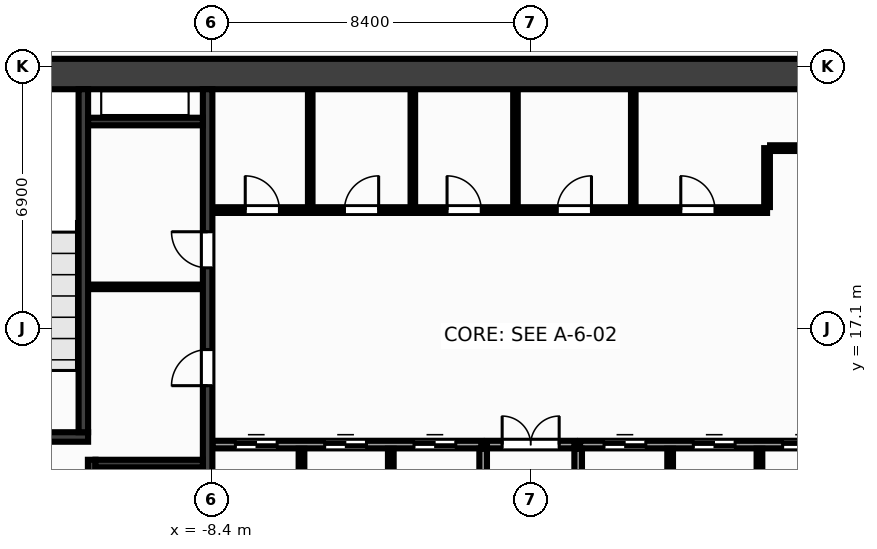
"""IFC4 building model, lengths in metres.
Left out: names, types, materials, properties, quantities, classifications, styles, units other than length and angle.
Written with IfcOpenShell. Run it as: python <this file> out.ifc"""

import sys

from ifc_helpers import new_model, si_unit, direction, frame, frame_2d, origin, place, context, subcontext, project, spatial, rectangle, extrude, source, transform, mapped, element, fill, save


model = new_model("IFC4")
c1 = context("Model", 3, precision=1e-05, world=origin(), true_north=direction((0.0, 1.0)))
c2 = subcontext(c1, "Body", "Model", "MODEL_VIEW")
j1 = project(units=[si_unit("LENGTHUNIT", "METRE"), si_unit("PLANEANGLEUNIT", "RADIAN")], contexts=[c1])
p1 = place(None, origin())
s1 = spatial("IfcSite", under=j1, at=p1, CompositionType="ELEMENT")
p2 = place(p1, origin())
s2 = spatial("IfcBuilding", under=s1, at=p2, CompositionType="ELEMENT")
p3 = place(p2, origin())
s3 = spatial("IfcBuildingStorey", under=s2, at=p3, CompositionType="ELEMENT", Elevation=0.0)
m1 = source(origin(), c2, "Body", "SweptSolid", [
    extrude(rectangle(XDim=32.0, YDim=0.8, at=frame_2d((16.0, 0.0))), origin(), (0.0, 0.0, 1.0), 5.0),
])
p4 = place(p3, frame((-16.0, 23.8, 0.0), z_axis=(0.0, 0.0, 1.0), x_axis=(1.0, 0.0, 0.0)))
e1 = element("IfcWall", 1, at=p4, inside=s3, PredefinedType="SHEAR", context=c2, shape_type="MappedRepresentation", body=[
    mapped(m1, transform((0.0, 0.0, 0.0), x_axis=(1.0, 0.0, 0.0), y_axis=(0.0, 1.0, 0.0), z_axis=(0.0, 0.0, 1.0), scale=1.0)),
])
m2 = source(origin(), c2, "Body", "SweptSolid", [
    extrude(rectangle(XDim=12.8, YDim=0.25, at=frame_2d((6.4, 0.0))), origin(), (0.0, 0.0, 1.0), 5.0),
])
p5 = place(p3, frame((-8.5, 10.6, 0.0), z_axis=(0.0, 0.0, 1.0), x_axis=(0.0, 1.0, 0.0)))
e2 = element("IfcWall", 2, at=p5, inside=s3, PredefinedType="SHEAR", context=c2, shape_type="MappedRepresentation", body=[
    mapped(m2, transform((0.0, 0.0, 0.0), x_axis=(1.0, 0.0, 0.0), y_axis=(0.0, 1.0, 0.0), z_axis=(0.0, 0.0, 1.0), scale=1.0)),
])
p6 = place(p5, frame((5.0, 0.0, 0.0)))
e3 = element("IfcOpeningElement", 3, at=p6, cuts=e2, PredefinedType="OPENING", context=c2, shape_type="SweptSolid", body=[
    extrude(rectangle(XDim=0.95, YDim=2.15, at=frame_2d((0.475, 1.075))), frame((0.0, 0.137, 0.0), z_axis=(0.0, -1.0, 0.0), x_axis=(1.0, 0.0, 0.0)), (0.0, 0.0, 1.0), 0.274),
])
p7 = place(p5, frame((8.1, 0.0, 0.0)))
e4 = element("IfcOpeningElement", 4, at=p7, cuts=e2, PredefinedType="OPENING", context=c2, shape_type="SweptSolid", body=[
    extrude(rectangle(XDim=0.95, YDim=2.15, at=frame_2d((0.475, 1.075))), frame((0.0, 0.137, 0.0), z_axis=(0.0, -1.0, 0.0), x_axis=(1.0, 0.0, 0.0)), (0.0, 0.0, 1.0), 0.274),
])
m3 = source(origin(), c2, "Body", "SweptSolid", [
    extrude(rectangle(XDim=3.555, YDim=0.25, at=frame_2d((1.777, 0.0))), origin(), (0.0, 0.0, 1.0), 5.0),
])
p8 = place(p3, frame((-15.2, 14.25, 0.0), z_axis=(0.0, 0.0, 1.0), x_axis=(1.0, 0.0, 0.0)))
e5 = element("IfcWall", 5, at=p8, inside=s3, PredefinedType="SHEAR", context=c2, shape_type="MappedRepresentation", body=[
    mapped(m3, transform((0.0, 0.0, 0.0), x_axis=(1.0, 0.0, 0.0), y_axis=(0.0, 1.0, 0.0), z_axis=(0.0, 0.0, 1.0), scale=1.0)),
])
p9 = place(p8, frame((0.95, 0.0, 0.0)))
e6 = element("IfcOpeningElement", 6, at=p9, cuts=e5, PredefinedType="OPENING", context=c2, shape_type="SweptSolid", body=[
    extrude(rectangle(XDim=1.6, YDim=2.15, at=frame_2d((0.8, 1.075))), frame((0.0, 0.137, 0.0), z_axis=(0.0, -1.0, 0.0), x_axis=(1.0, 0.0, 0.0)), (0.0, 0.0, 1.0), 0.274),
])
m4 = source(origin(), c2, "Body", "SweptSolid", [
    extrude(rectangle(XDim=9.025, YDim=0.25, at=frame_2d((4.512, 0.0))), origin(), (0.0, 0.0, 1.0), 5.0),
])
p10 = place(p3, frame((-11.77, 14.375, 0.0), z_axis=(0.0, 0.0, 1.0), x_axis=(0.0, 1.0, 0.0)))
e7 = element("IfcWall", 7, at=p10, inside=s3, PredefinedType="SHEAR", context=c2, shape_type="MappedRepresentation", body=[
    mapped(m4, transform((0.0, 0.0, 0.0), x_axis=(1.0, 0.0, 0.0), y_axis=(0.0, 1.0, 0.0), z_axis=(0.0, 0.0, 1.0), scale=1.0)),
])
m5 = source(origin(), c2, "Body", "SweptSolid", [
    extrude(rectangle(XDim=3.05, YDim=0.2, at=frame_2d((1.525, 0.0))), origin(), (0.0, 0.0, 1.0), 5.0),
])
p11 = place(p3, frame((-11.55, 10.6, 0.0), z_axis=(0.0, 0.0, 1.0), x_axis=(0.0, 1.0, 0.0)))
e8 = element("IfcWall", 8, at=p11, inside=s3, PredefinedType="SHEAR", context=c2, shape_type="MappedRepresentation", body=[
    mapped(m5, transform((0.0, 0.0, 0.0), x_axis=(1.0, 0.0, 0.0), y_axis=(0.0, 1.0, 0.0), z_axis=(0.0, 0.0, 1.0), scale=1.0)),
])
p12 = place(p11, frame((0.9, 0.0, 0.0)))
e9 = element("IfcOpeningElement", 9, at=p12, cuts=e8, PredefinedType="OPENING", context=c2, shape_type="SweptSolid", body=[
    extrude(rectangle(XDim=1.1, YDim=2.15, at=frame_2d((0.55, 1.075))), frame((0.0, 0.112, 0.0), z_axis=(0.0, -1.0, 0.0), x_axis=(1.0, 0.0, 0.0)), (0.0, 0.0, 1.0), 0.224),
])
m6 = source(origin(), c2, "Body", "SweptSolid", [
    extrude(rectangle(XDim=2.825, YDim=0.2, at=frame_2d((1.413, 0.0))), origin(), (0.0, 0.0, 1.0), 5.0),
])
p13 = place(p3, frame((-11.45, 13.55, 0.0), z_axis=(0.0, 0.0, 1.0), x_axis=(1.0, 0.0, 0.0)))
e10 = element("IfcWall", 10, at=p13, inside=s3, PredefinedType="SHEAR", context=c2, shape_type="MappedRepresentation", body=[
    mapped(m6, transform((0.0, 0.0, 0.0), x_axis=(1.0, 0.0, 0.0), y_axis=(0.0, 1.0, 0.0), z_axis=(0.0, 0.0, 1.0), scale=1.0)),
])
m7 = source(origin(), c2, "Body", "SweptSolid", [
    extrude(rectangle(XDim=3.02, YDim=0.2, at=frame_2d((1.51, 0.0))), origin(), (0.0, 0.0, 1.0), 5.0),
])
p14 = place(p3, frame((-11.645, 22.55, 0.0), z_axis=(0.0, 0.0, 1.0), x_axis=(1.0, 0.0, 0.0)))
e11 = element("IfcWall", 11, at=p14, inside=s3, PredefinedType="SHEAR", context=c2, shape_type="MappedRepresentation", body=[
    mapped(m7, transform((0.0, 0.0, 0.0), x_axis=(1.0, 0.0, 0.0), y_axis=(0.0, 1.0, 0.0), z_axis=(0.0, 0.0, 1.0), scale=1.0)),
])
m8 = source(origin(), c2, "Body", "SweptSolid", [
    extrude(rectangle(XDim=3.01, YDim=0.12, at=frame_2d((1.505, 0.0))), origin(), (0.0, 0.0, 1.0), 4.72),
])
p15 = place(p3, frame((-11.64, 18.2, 0.0), z_axis=(0.0, 0.0, 1.0), x_axis=(1.0, 0.0, 0.0)))
e12 = element("IfcWall", 12, at=p15, inside=s3, PredefinedType="PARTITIONING", context=c2, shape_type="MappedRepresentation", body=[
    mapped(m8, transform((0.0, 0.0, 0.0), x_axis=(1.0, 0.0, 0.0), y_axis=(0.0, 1.0, 0.0), z_axis=(0.0, 0.0, 1.0), scale=1.0)),
])
m9 = source(origin(), c2, "Body", "SweptSolid", [
    extrude(rectangle(XDim=7.07, YDim=0.2, at=frame_2d((3.535, 0.0))), origin(), (0.0, 0.0, 1.0), 4.72),
])
p16 = place(p3, frame((-8.37, 14.05, 0.0), z_axis=(0.0, 0.0, 1.0), x_axis=(1.0, 0.0, 0.0)))
e13 = element("IfcWall", 13, at=p16, inside=s3, PredefinedType="PARTITIONING", context=c2, shape_type="MappedRepresentation", body=[
    mapped(m9, transform((0.0, 0.0, 0.0), x_axis=(1.0, 0.0, 0.0), y_axis=(0.0, 1.0, 0.0), z_axis=(0.0, 0.0, 1.0), scale=1.0)),
])
p17 = place(p16, frame((0.6, 0.0, 0.0)))
e14 = element("IfcOpeningElement", 14, at=p17, cuts=e13, PredefinedType="OPENING", context=c2, shape_type="SweptSolid", body=[
    extrude(rectangle(XDim=1.1, YDim=2.15, at=frame_2d((0.55, 1.075))), frame((0.0, 0.112, 0.0), z_axis=(0.0, -1.0, 0.0), x_axis=(1.0, 0.0, 0.0)), (0.0, 0.0, 1.0), 0.224),
])
p18 = place(p16, frame((2.95, 0.0, 0.0)))
e15 = element("IfcOpeningElement", 15, at=p18, cuts=e13, PredefinedType="OPENING", context=c2, shape_type="SweptSolid", body=[
    extrude(rectangle(XDim=1.1, YDim=2.15, at=frame_2d((0.55, 1.075))), frame((0.0, 0.112, 0.0), z_axis=(0.0, -1.0, 0.0), x_axis=(1.0, 0.0, 0.0)), (0.0, 0.0, 1.0), 0.224),
])
p19 = place(p16, frame((5.3, 0.0, 0.0)))
e16 = element("IfcOpeningElement", 16, at=p19, cuts=e13, PredefinedType="OPENING", context=c2, shape_type="SweptSolid", body=[
    extrude(rectangle(XDim=1.1, YDim=2.15, at=frame_2d((0.55, 1.075))), frame((0.0, 0.112, 0.0), z_axis=(0.0, -1.0, 0.0), x_axis=(1.0, 0.0, 0.0)), (0.0, 0.0, 1.0), 0.224),
])
p20 = place(p3, frame((1.3, 14.05, 0.0), z_axis=(0.0, 0.0, 1.0), x_axis=(1.0, 0.0, 0.0)))
e17 = element("IfcWall", 17, at=p20, inside=s3, PredefinedType="PARTITIONING", context=c2, shape_type="MappedRepresentation", body=[
    mapped(m9, transform((0.0, 0.0, 0.0), x_axis=(1.0, 0.0, 0.0), y_axis=(0.0, 1.0, 0.0), z_axis=(0.0, 0.0, 1.0), scale=1.0)),
])
p21 = place(p20, frame((0.63, 0.0, 0.0)))
e18 = element("IfcOpeningElement", 18, at=p21, cuts=e17, PredefinedType="OPENING", context=c2, shape_type="SweptSolid", body=[
    extrude(rectangle(XDim=1.1, YDim=2.15, at=frame_2d((0.55, 1.075))), frame((0.0, 0.112, 0.0), z_axis=(0.0, -1.0, 0.0), x_axis=(1.0, 0.0, 0.0)), (0.0, 0.0, 1.0), 0.224),
])
p22 = place(p20, frame((2.98, 0.0, 0.0)))
e19 = element("IfcOpeningElement", 19, at=p22, cuts=e17, PredefinedType="OPENING", context=c2, shape_type="SweptSolid", body=[
    extrude(rectangle(XDim=1.1, YDim=2.15, at=frame_2d((0.55, 1.075))), frame((0.0, 0.112, 0.0), z_axis=(0.0, -1.0, 0.0), x_axis=(1.0, 0.0, 0.0)), (0.0, 0.0, 1.0), 0.224),
])
p23 = place(p20, frame((5.33, 0.0, 0.0)))
e20 = element("IfcOpeningElement", 20, at=p23, cuts=e17, PredefinedType="OPENING", context=c2, shape_type="SweptSolid", body=[
    extrude(rectangle(XDim=1.1, YDim=2.15, at=frame_2d((0.55, 1.075))), frame((0.0, 0.112, 0.0), z_axis=(0.0, -1.0, 0.0), x_axis=(1.0, 0.0, 0.0)), (0.0, 0.0, 1.0), 0.224),
])
m10 = source(origin(), c2, "Body", "SweptSolid", [
    extrude(rectangle(XDim=3.34, YDim=0.2, at=frame_2d((1.67, 0.0))), origin(), (0.0, 0.0, 1.0), 4.72),
])
for number, where, z_axis, x_axis in (
    (21, (-1.25, 10.6, 0.0), (0.0, 0.0, 1.0), (0.0, 1.0, 0.0)),
    (22, (1.25, 10.6, 0.0), (0.0, 0.0, 1.0), (0.0, 1.0, 0.0)),
):
    element("IfcWall", number, at=place(p3, frame(where, z_axis=z_axis, x_axis=x_axis)), inside=s3, PredefinedType="PARTITIONING", context=c2, shape_type="MappedRepresentation", body=[
        mapped(m10, transform((0.0, 0.0, 0.0), x_axis=(1.0, 0.0, 0.0), y_axis=(0.0, 1.0, 0.0), z_axis=(0.0, 0.0, 1.0), scale=1.0)),
    ])
m11 = source(origin(), c2, "Body", "SweptSolid", [
    extrude(rectangle(XDim=2.3, YDim=0.2, at=frame_2d((1.15, 0.0))), origin(), (0.0, 0.0, 1.0), 4.72),
])
p24 = place(p3, frame((-1.15, 14.05, 0.0), z_axis=(0.0, 0.0, 1.0), x_axis=(1.0, 0.0, 0.0)))
e23 = element("IfcWall", 23, at=p24, inside=s3, PredefinedType="PARTITIONING", context=c2, shape_type="MappedRepresentation", body=[
    mapped(m11, transform((0.0, 0.0, 0.0), x_axis=(1.0, 0.0, 0.0), y_axis=(0.0, 1.0, 0.0), z_axis=(0.0, 0.0, 1.0), scale=1.0)),
])
p25 = place(p24, frame((0.4, 0.0, 0.0)))
e24 = element("IfcOpeningElement", 24, at=p25, cuts=e23, PredefinedType="OPENING", context=c2, shape_type="SweptSolid", body=[
    extrude(rectangle(XDim=1.5, YDim=2.2, at=frame_2d((0.75, 1.1))), frame((0.0, 0.112, 0.0), z_axis=(0.0, -1.0, 0.0), x_axis=(1.0, 0.0, 0.0)), (0.0, 0.0, 1.0), 0.224),
])
m12 = source(origin(), c2, "Body", "SweptSolid", [
    extrude(rectangle(XDim=14.59, YDim=0.15, at=frame_2d((7.295, 0.0))), origin(), (0.0, 0.0, 1.0), 4.72),
])
p26 = place(p3, frame((-8.37, 20.22, 0.0), z_axis=(0.0, 0.0, 1.0), x_axis=(1.0, 0.0, 0.0)))
e25 = element("IfcWall", 25, at=p26, inside=s3, PredefinedType="PARTITIONING", context=c2, shape_type="MappedRepresentation", body=[
    mapped(m12, transform((0.0, 0.0, 0.0), x_axis=(1.0, 0.0, 0.0), y_axis=(0.0, 1.0, 0.0), z_axis=(0.0, 0.0, 1.0), scale=1.0)),
])
p27 = place(p26, frame((0.86, 0.0, 0.0)))
e26 = element("IfcOpeningElement", 26, at=p27, cuts=e25, PredefinedType="OPENING", context=c2, shape_type="SweptSolid", body=[
    extrude(rectangle(XDim=0.9, YDim=2.15, at=frame_2d((0.45, 1.075))), frame((0.0, 0.087, 0.0), z_axis=(0.0, -1.0, 0.0), x_axis=(1.0, 0.0, 0.0)), (0.0, 0.0, 1.0), 0.174),
])
p28 = place(p26, frame((3.47, 0.0, 0.0)))
e27 = element("IfcOpeningElement", 27, at=p28, cuts=e25, PredefinedType="OPENING", context=c2, shape_type="SweptSolid", body=[
    extrude(rectangle(XDim=0.9, YDim=2.15, at=frame_2d((0.45, 1.075))), frame((0.0, 0.087, 0.0), z_axis=(0.0, -1.0, 0.0), x_axis=(1.0, 0.0, 0.0)), (0.0, 0.0, 1.0), 0.174),
])
p29 = place(p26, frame((6.17, 0.0, 0.0)))
e28 = element("IfcOpeningElement", 28, at=p29, cuts=e25, PredefinedType="OPENING", context=c2, shape_type="SweptSolid", body=[
    extrude(rectangle(XDim=0.9, YDim=2.15, at=frame_2d((0.45, 1.075))), frame((0.0, 0.087, 0.0), z_axis=(0.0, -1.0, 0.0), x_axis=(1.0, 0.0, 0.0)), (0.0, 0.0, 1.0), 0.174),
])
p30 = place(p26, frame((9.07, 0.0, 0.0)))
e29 = element("IfcOpeningElement", 29, at=p30, cuts=e25, PredefinedType="OPENING", context=c2, shape_type="SweptSolid", body=[
    extrude(rectangle(XDim=0.9, YDim=2.15, at=frame_2d((0.45, 1.075))), frame((0.0, 0.087, 0.0), z_axis=(0.0, -1.0, 0.0), x_axis=(1.0, 0.0, 0.0)), (0.0, 0.0, 1.0), 0.174),
])
p31 = place(p26, frame((12.32, 0.0, 0.0)))
e30 = element("IfcOpeningElement", 30, at=p31, cuts=e25, PredefinedType="OPENING", context=c2, shape_type="SweptSolid", body=[
    extrude(rectangle(XDim=0.9, YDim=2.15, at=frame_2d((0.45, 1.075))), frame((0.0, 0.087, 0.0), z_axis=(0.0, -1.0, 0.0), x_axis=(1.0, 0.0, 0.0)), (0.0, 0.0, 1.0), 0.174),
])
m13 = source(origin(), c2, "Body", "SweptSolid", [
    extrude(rectangle(XDim=1.55, YDim=0.15, at=frame_2d((0.775, 0.0))), origin(), (0.0, 0.0, 1.0), 4.72),
])
p32 = place(p3, frame((6.22, 20.3, 0.0), z_axis=(0.0, 0.0, 1.0), x_axis=(0.0, 1.0, 0.0)))
e31 = element("IfcWall", 31, at=p32, inside=s3, PredefinedType="PARTITIONING", context=c2, shape_type="MappedRepresentation", body=[
    mapped(m13, transform((0.0, 0.0, 0.0), x_axis=(1.0, 0.0, 0.0), y_axis=(0.0, 1.0, 0.0), z_axis=(0.0, 0.0, 1.0), scale=1.0)),
])
m14 = source(origin(), c2, "Body", "SweptSolid", [
    extrude(rectangle(XDim=2.07, YDim=0.15, at=frame_2d((1.035, 0.0))), origin(), (0.0, 0.0, 1.0), 4.72),
])
p33 = place(p3, frame((6.3, 21.85, 0.0), z_axis=(0.0, 0.0, 1.0), x_axis=(1.0, 0.0, 0.0)))
e32 = element("IfcWall", 32, at=p33, inside=s3, PredefinedType="PARTITIONING", context=c2, shape_type="MappedRepresentation", body=[
    mapped(m14, transform((0.0, 0.0, 0.0), x_axis=(1.0, 0.0, 0.0), y_axis=(0.0, 1.0, 0.0), z_axis=(0.0, 0.0, 1.0), scale=1.0)),
])
m15 = source(origin(), c2, "Body", "SweptSolid", [
    extrude(rectangle(XDim=3.34, YDim=0.15, at=frame_2d((1.67, 0.0))), origin(), (0.0, 0.0, 1.0), 4.72),
])
for number, where, z_axis, x_axis in (
    (33, (-6.03, 10.6, 0.0), (0.0, 0.0, 1.0), (0.0, 1.0, 0.0)),
    (34, (-3.68, 10.6, 0.0), (0.0, 0.0, 1.0), (0.0, 1.0, 0.0)),
    (35, (3.67, 10.6, 0.0), (0.0, 0.0, 1.0), (0.0, 1.0, 0.0)),
    (36, (6.02, 10.6, 0.0), (0.0, 0.0, 1.0), (0.0, 1.0, 0.0)),
):
    element("IfcWall", number, at=place(p3, frame(where, z_axis=z_axis, x_axis=x_axis)), inside=s3, PredefinedType="PARTITIONING", context=c2, shape_type="MappedRepresentation", body=[
        mapped(m15, transform((0.0, 0.0, 0.0), x_axis=(1.0, 0.0, 0.0), y_axis=(0.0, 1.0, 0.0), z_axis=(0.0, 0.0, 1.0), scale=1.0)),
    ])
m16 = source(origin(), c2, "Body", "SweptSolid", [
    extrude(rectangle(XDim=3.04, YDim=0.12, at=frame_2d((1.52, 0.0))), origin(), (0.0, 0.0, 1.0), 4.72),
])
for number, where, z_axis, x_axis in (
    (37, (-5.8, 20.32, 0.0), (0.0, 0.0, 1.0), (0.0, 1.0, 0.0)),
    (38, (-3.1, 20.32, 0.0), (0.0, 0.0, 1.0), (0.0, 1.0, 0.0)),
    (39, (-0.4, 20.32, 0.0), (0.0, 0.0, 1.0), (0.0, 1.0, 0.0)),
    (40, (2.7, 20.32, 0.0), (0.0, 0.0, 1.0), (0.0, 1.0, 0.0)),
):
    element("IfcWall", number, at=place(p3, frame(where, z_axis=z_axis, x_axis=x_axis)), inside=s3, PredefinedType="PARTITIONING", context=c2, shape_type="MappedRepresentation", body=[
        mapped(m16, transform((0.0, 0.0, 0.0), x_axis=(1.0, 0.0, 0.0), y_axis=(0.0, 1.0, 0.0), z_axis=(0.0, 0.0, 1.0), scale=1.0)),
    ])
m17 = source(origin(), c2, "Body", "SweptSolid", [
    extrude(rectangle(XDim=0.95, YDim=2.15, at=frame_2d((0.475, 1.075))), frame((0.0, 0.025, 0.0), z_axis=(0.0, -1.0, 0.0), x_axis=(1.0, 0.0, 0.0)), (0.0, 0.0, 1.0), 0.05),
])
p34 = place(p6, origin())
e41 = element("IfcDoor", 41, at=p34, inside=s3, OperationType="SINGLE_SWING_LEFT", PredefinedType="DOOR", context=c2, shape_type="MappedRepresentation", body=[
    mapped(m17, transform((0.0, 0.0, 0.0), x_axis=(1.0, 0.0, 0.0), y_axis=(0.0, 1.0, 0.0), z_axis=(0.0, 0.0, 1.0), scale=1.0)),
])
fill(e3, e41)
p35 = place(p7, origin())
e42 = element("IfcDoor", 42, at=p35, inside=s3, OperationType="SINGLE_SWING_RIGHT", PredefinedType="DOOR", context=c2, shape_type="MappedRepresentation", body=[
    mapped(m17, transform((0.0, 0.0, 0.0), x_axis=(1.0, 0.0, 0.0), y_axis=(0.0, 1.0, 0.0), z_axis=(0.0, 0.0, 1.0), scale=1.0)),
])
fill(e4, e42)
m18 = source(origin(), c2, "Body", "SweptSolid", [
    extrude(rectangle(XDim=1.1, YDim=2.15, at=frame_2d((0.55, 1.075))), frame((0.0, 0.025, 0.0), z_axis=(0.0, -1.0, 0.0), x_axis=(1.0, 0.0, 0.0)), (0.0, 0.0, 1.0), 0.05),
])
p36 = place(p17, origin())
e43 = element("IfcDoor", 43, at=p36, inside=s3, OperationType="DOUBLE_DOOR_SLIDING", PredefinedType="DOOR", context=c2, shape_type="MappedRepresentation", body=[
    mapped(m18, transform((0.0, 0.0, 0.0), x_axis=(1.0, 0.0, 0.0), y_axis=(0.0, 1.0, 0.0), z_axis=(0.0, 0.0, 1.0), scale=1.0)),
])
fill(e14, e43)
p37 = place(p18, origin())
e44 = element("IfcDoor", 44, at=p37, inside=s3, OperationType="DOUBLE_DOOR_SLIDING", PredefinedType="DOOR", context=c2, shape_type="MappedRepresentation", body=[
    mapped(m18, transform((0.0, 0.0, 0.0), x_axis=(1.0, 0.0, 0.0), y_axis=(0.0, 1.0, 0.0), z_axis=(0.0, 0.0, 1.0), scale=1.0)),
])
fill(e15, e44)
p38 = place(p19, origin())
e45 = element("IfcDoor", 45, at=p38, inside=s3, OperationType="DOUBLE_DOOR_SLIDING", PredefinedType="DOOR", context=c2, shape_type="MappedRepresentation", body=[
    mapped(m18, transform((0.0, 0.0, 0.0), x_axis=(1.0, 0.0, 0.0), y_axis=(0.0, 1.0, 0.0), z_axis=(0.0, 0.0, 1.0), scale=1.0)),
])
fill(e16, e45)
p39 = place(p21, origin())
e46 = element("IfcDoor", 46, at=p39, inside=s3, OperationType="DOUBLE_DOOR_SLIDING", PredefinedType="DOOR", context=c2, shape_type="MappedRepresentation", body=[
    mapped(m18, transform((0.0, 0.0, 0.0), x_axis=(1.0, 0.0, 0.0), y_axis=(0.0, 1.0, 0.0), z_axis=(0.0, 0.0, 1.0), scale=1.0)),
])
fill(e18, e46)
p40 = place(p22, origin())
e47 = element("IfcDoor", 47, at=p40, inside=s3, OperationType="DOUBLE_DOOR_SLIDING", PredefinedType="DOOR", context=c2, shape_type="MappedRepresentation", body=[
    mapped(m18, transform((0.0, 0.0, 0.0), x_axis=(1.0, 0.0, 0.0), y_axis=(0.0, 1.0, 0.0), z_axis=(0.0, 0.0, 1.0), scale=1.0)),
])
fill(e19, e47)
p41 = place(p23, origin())
e48 = element("IfcDoor", 48, at=p41, inside=s3, OperationType="DOUBLE_DOOR_SLIDING", PredefinedType="DOOR", context=c2, shape_type="MappedRepresentation", body=[
    mapped(m18, transform((0.0, 0.0, 0.0), x_axis=(1.0, 0.0, 0.0), y_axis=(0.0, 1.0, 0.0), z_axis=(0.0, 0.0, 1.0), scale=1.0)),
])
fill(e20, e48)
m19 = source(origin(), c2, "Body", "SweptSolid", [
    extrude(rectangle(XDim=1.5, YDim=2.2, at=frame_2d((0.75, 1.1))), frame((0.0, 0.025, 0.0), z_axis=(0.0, -1.0, 0.0), x_axis=(1.0, 0.0, 0.0)), (0.0, 0.0, 1.0), 0.05),
])
p42 = place(p25, origin())
e49 = element("IfcDoor", 49, at=p42, inside=s3, OperationType="DOUBLE_DOOR_SINGLE_SWING", PredefinedType="DOOR", context=c2, shape_type="MappedRepresentation", body=[
    mapped(m19, transform((0.0, 0.0, 0.0), x_axis=(1.0, 0.0, 0.0), y_axis=(0.0, 1.0, 0.0), z_axis=(0.0, 0.0, 1.0), scale=1.0)),
])
fill(e24, e49)
m20 = source(origin(), c2, "Body", "SweptSolid", [
    extrude(rectangle(XDim=0.9, YDim=2.15, at=frame_2d((0.45, 1.075))), frame((0.0, 0.025, 0.0), z_axis=(0.0, -1.0, 0.0), x_axis=(1.0, 0.0, 0.0)), (0.0, 0.0, 1.0), 0.05),
])
p43 = place(p27, origin())
e50 = element("IfcDoor", 50, at=p43, inside=s3, OperationType="SINGLE_SWING_LEFT", PredefinedType="DOOR", context=c2, shape_type="MappedRepresentation", body=[
    mapped(m20, transform((0.0, 0.0, 0.0), x_axis=(1.0, 0.0, 0.0), y_axis=(0.0, 1.0, 0.0), z_axis=(0.0, 0.0, 1.0), scale=1.0)),
])
fill(e26, e50)
p44 = place(p28, origin())
e51 = element("IfcDoor", 51, at=p44, inside=s3, OperationType="SINGLE_SWING_RIGHT", PredefinedType="DOOR", context=c2, shape_type="MappedRepresentation", body=[
    mapped(m20, transform((0.0, 0.0, 0.0), x_axis=(1.0, 0.0, 0.0), y_axis=(0.0, 1.0, 0.0), z_axis=(0.0, 0.0, 1.0), scale=1.0)),
])
fill(e27, e51)
p45 = place(p29, origin())
e52 = element("IfcDoor", 52, at=p45, inside=s3, OperationType="SINGLE_SWING_LEFT", PredefinedType="DOOR", context=c2, shape_type="MappedRepresentation", body=[
    mapped(m20, transform((0.0, 0.0, 0.0), x_axis=(1.0, 0.0, 0.0), y_axis=(0.0, 1.0, 0.0), z_axis=(0.0, 0.0, 1.0), scale=1.0)),
])
fill(e28, e52)
p46 = place(p30, origin())
e53 = element("IfcDoor", 53, at=p46, inside=s3, OperationType="SINGLE_SWING_RIGHT", PredefinedType="DOOR", context=c2, shape_type="MappedRepresentation", body=[
    mapped(m20, transform((0.0, 0.0, 0.0), x_axis=(1.0, 0.0, 0.0), y_axis=(0.0, 1.0, 0.0), z_axis=(0.0, 0.0, 1.0), scale=1.0)),
])
fill(e29, e53)
p47 = place(p31, origin())
e54 = element("IfcDoor", 54, at=p47, inside=s3, OperationType="SINGLE_SWING_LEFT", PredefinedType="DOOR", context=c2, shape_type="MappedRepresentation", body=[
    mapped(m20, transform((0.0, 0.0, 0.0), x_axis=(1.0, 0.0, 0.0), y_axis=(0.0, 1.0, 0.0), z_axis=(0.0, 0.0, 1.0), scale=1.0)),
])
fill(e30, e54)
save(model, sys.argv[1])
